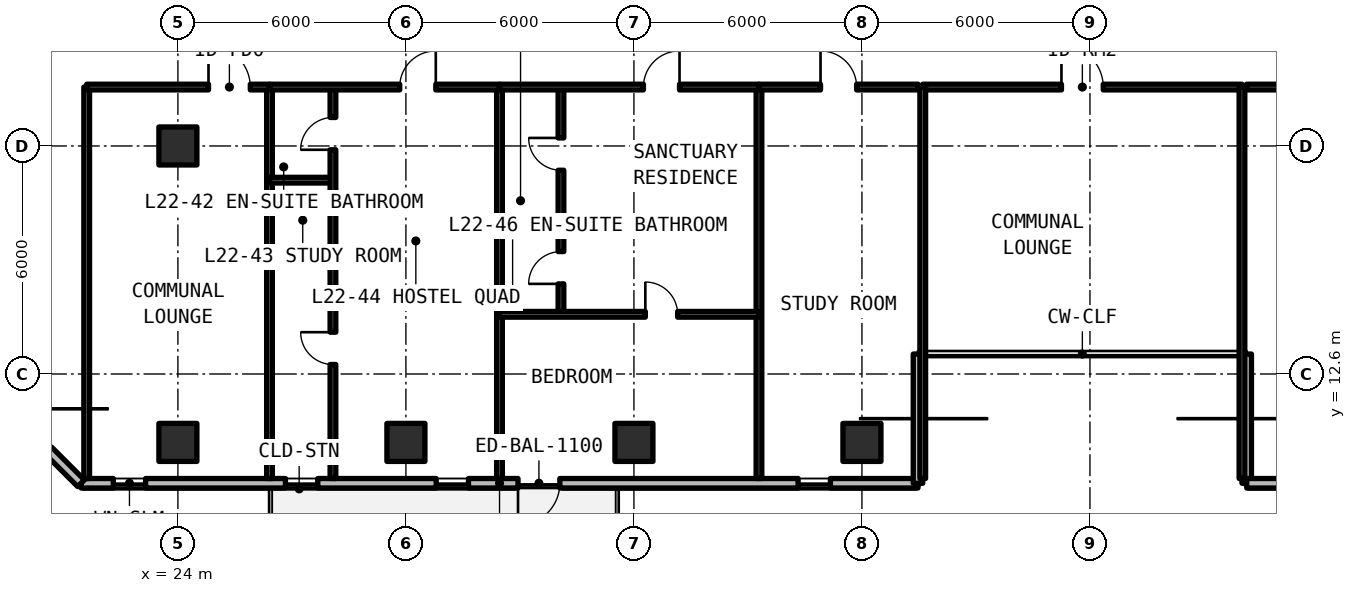
"""IFC4 building model, lengths in metres.
Left out: names, types, materials, properties, quantities, classifications, styles, units other than length and angle.
Written with IfcOpenShell. Run it as: python <this file> out.ifc"""

import sys

from ifc_helpers import new_model, si_unit, direction, frame, frame_2d, origin, origin_2d, place, context, subcontext, project, spatial, rectangle, extrude, element, fill, save


model = new_model("IFC4")
c1 = context("Model", 3, precision=1e-05, world=origin(), true_north=direction((0.0, 1.0)))
c2 = subcontext(c1, "Body", "Model", "MODEL_VIEW")
j1 = project(units=[si_unit("LENGTHUNIT", "METRE"), si_unit("PLANEANGLEUNIT", "RADIAN")], contexts=[c1])
p1 = place(None, origin())
s1 = spatial("IfcSite", under=j1, at=p1, CompositionType="ELEMENT")
p2 = place(p1, origin())
s2 = spatial("IfcBuilding", under=s1, at=p2, CompositionType="ELEMENT")
p3 = place(p2, frame((0.0, 0.0, 82.17)))
s3 = spatial("IfcBuildingStorey", under=s2, at=p3, CompositionType="ELEMENT", Elevation=82.17)
for number, where, z_axis, x_axis in (
    (1, (24.0, 18.6, 0.0), (0.0, 0.0, 1.0), (1.0, 0.0, 0.0)),
    (2, (24.0, 10.8, 0.0), (0.0, 0.0, 1.0), (1.0, 0.0, 0.0)),
    (3, (30.0, 10.8, 0.0), (0.0, 0.0, 1.0), (1.0, 0.0, 0.0)),
    (4, (36.0, 10.8, 0.0), (0.0, 0.0, 1.0), (1.0, 0.0, 0.0)),
    (5, (42.0, 10.8, 0.0), (0.0, 0.0, 1.0), (1.0, 0.0, 0.0)),
):
    element("IfcColumn", number, at=place(p3, frame(where, z_axis=z_axis, x_axis=x_axis)), inside=s3, PredefinedType="COLUMN", context=c2, shape_type="SweptSolid", body=[
        extrude(rectangle(XDim=1.0, YDim=1.0, at=origin_2d()), origin(), (0.0, 0.0, 1.0), 3.3),
    ])
p4 = place(p3, frame((21.452, 9.725, 0.0), z_axis=(0.0, 0.0, 1.0), x_axis=(1.0, 0.0, 0.0)))
e6 = element("IfcWall", 6, at=p4, inside=s3, PredefinedType="SOLIDWALL", context=c2, shape_type="SweptSolid", body=[
    extrude(rectangle(XDim=22.023, YDim=0.25, at=frame_2d((11.012, 0.0))), origin(), (0.0, 0.0, 1.0), 3.08),
])
p5 = place(p4, frame((11.498, 0.0, 0.0)))
e7 = element("IfcOpeningElement", 7, at=p5, cuts=e6, PredefinedType="OPENING", context=c2, shape_type="SweptSolid", body=[
    extrude(rectangle(XDim=1.1, YDim=2.15, at=frame_2d((0.55, 1.075))), frame((0.0, 0.135, 0.0), z_axis=(0.0, -1.0, 0.0), x_axis=(1.0, 0.0, 0.0)), (0.0, 0.0, 1.0), 0.27),
])
p6 = place(p4, frame((0.848, 0.0, 0.78)))
e8 = element("IfcOpeningElement", 8, at=p6, cuts=e6, PredefinedType="OPENING", context=c2, shape_type="SweptSolid", body=[
    extrude(rectangle(XDim=0.85, YDim=1.65, at=frame_2d((0.425, 0.825))), frame((0.0, 0.135, 0.0), z_axis=(0.0, -1.0, 0.0), x_axis=(1.0, 0.0, 0.0)), (0.0, 0.0, 1.0), 0.27),
])
p7 = place(p4, frame((5.378, 0.0, 0.78)))
e9 = element("IfcOpeningElement", 9, at=p7, cuts=e6, PredefinedType="OPENING", context=c2, shape_type="SweptSolid", body=[
    extrude(rectangle(XDim=0.85, YDim=1.65, at=frame_2d((0.425, 0.825))), frame((0.0, 0.135, 0.0), z_axis=(0.0, -1.0, 0.0), x_axis=(1.0, 0.0, 0.0)), (0.0, 0.0, 1.0), 0.27),
])
p8 = place(p4, frame((9.344, 0.0, 0.78)))
e10 = element("IfcOpeningElement", 10, at=p8, cuts=e6, PredefinedType="OPENING", context=c2, shape_type="SweptSolid", body=[
    extrude(rectangle(XDim=0.85, YDim=1.65, at=frame_2d((0.425, 0.825))), frame((0.0, 0.135, 0.0), z_axis=(0.0, -1.0, 0.0), x_axis=(1.0, 0.0, 0.0)), (0.0, 0.0, 1.0), 0.27),
])
p9 = place(p4, frame((18.868, 0.0, 0.78)))
e11 = element("IfcOpeningElement", 11, at=p9, cuts=e6, PredefinedType="OPENING", context=c2, shape_type="SweptSolid", body=[
    extrude(rectangle(XDim=0.85, YDim=1.65, at=frame_2d((0.425, 0.825))), frame((0.0, 0.135, 0.0), z_axis=(0.0, -1.0, 0.0), x_axis=(1.0, 0.0, 0.0)), (0.0, 0.0, 1.0), 0.27),
])
for number, where, z_axis, x_axis in (
    (12, (43.475, 9.725, 0.0), (0.0, 0.0, 1.0), (0.0, 1.0, 0.0)),
    (13, (52.125, 13.125, 0.0), (0.0, 0.0, 1.0), (0.0, -1.0, 0.0)),
):
    element("IfcWall", number, at=place(p3, frame(where, z_axis=z_axis, x_axis=x_axis)), inside=s3, PredefinedType="SOLIDWALL", context=c2, shape_type="SweptSolid", body=[
        extrude(rectangle(XDim=3.4, YDim=0.25, at=frame_2d((1.7, 0.0))), origin(), (0.0, 0.0, 1.0), 3.08),
    ])
p10 = place(p3, frame((52.125, 9.725, 0.0), z_axis=(0.0, 0.0, 1.0), x_axis=(1.0, 0.0, 0.0)))
e14 = element("IfcWall", 14, at=p10, inside=s3, PredefinedType="SOLIDWALL", context=c2, shape_type="SweptSolid", body=[
    extrude(rectangle(XDim=44.023, YDim=0.25, at=frame_2d((22.012, 0.0))), origin(), (0.0, 0.0, 1.0), 3.08),
])
p11 = place(p10, frame((10.875, 0.0, 0.0)))
e15 = element("IfcOpeningElement", 15, at=p11, cuts=e14, PredefinedType="OPENING", context=c2, shape_type="SweptSolid", body=[
    extrude(rectangle(XDim=1.1, YDim=2.15, at=frame_2d((0.55, 1.075))), frame((0.0, 0.135, 0.0), z_axis=(0.0, -1.0, 0.0), x_axis=(1.0, 0.0, 0.0)), (0.0, 0.0, 1.0), 0.27),
])
p12 = place(p10, frame((22.975, 0.0, 0.0)))
e16 = element("IfcOpeningElement", 16, at=p12, cuts=e14, PredefinedType="OPENING", context=c2, shape_type="SweptSolid", body=[
    extrude(rectangle(XDim=1.1, YDim=2.15, at=frame_2d((0.55, 1.075))), frame((0.0, 0.135, 0.0), z_axis=(0.0, -1.0, 0.0), x_axis=(1.0, 0.0, 0.0)), (0.0, 0.0, 1.0), 0.27),
])
p13 = place(p10, frame((35.075, 0.0, 0.0)))
e17 = element("IfcOpeningElement", 17, at=p13, cuts=e14, PredefinedType="OPENING", context=c2, shape_type="SweptSolid", body=[
    extrude(rectangle(XDim=1.1, YDim=2.15, at=frame_2d((0.55, 1.075))), frame((0.0, 0.135, 0.0), z_axis=(0.0, -1.0, 0.0), x_axis=(1.0, 0.0, 0.0)), (0.0, 0.0, 1.0), 0.27),
])
p14 = place(p10, frame((2.669, 0.0, 0.78)))
e18 = element("IfcOpeningElement", 18, at=p14, cuts=e14, PredefinedType="OPENING", context=c2, shape_type="SweptSolid", body=[
    extrude(rectangle(XDim=2.0, YDim=1.66, at=frame_2d((1.0, 0.83))), frame((0.0, 0.135, 0.0), z_axis=(0.0, -1.0, 0.0), x_axis=(1.0, 0.0, 0.0)), (0.0, 0.0, 1.0), 0.27),
])
p15 = place(p10, frame((8.314, 0.0, 0.78)))
e19 = element("IfcOpeningElement", 19, at=p15, cuts=e14, PredefinedType="OPENING", context=c2, shape_type="SweptSolid", body=[
    extrude(rectangle(XDim=0.85, YDim=1.65, at=frame_2d((0.425, 0.825))), frame((0.0, 0.135, 0.0), z_axis=(0.0, -1.0, 0.0), x_axis=(1.0, 0.0, 0.0)), (0.0, 0.0, 1.0), 0.27),
])
p16 = place(p10, frame((27.363, 0.0, 0.78)))
e20 = element("IfcOpeningElement", 20, at=p16, cuts=e14, PredefinedType="OPENING", context=c2, shape_type="SweptSolid", body=[
    extrude(rectangle(XDim=2.0, YDim=1.66, at=frame_2d((1.0, 0.83))), frame((0.0, 0.135, 0.0), z_axis=(0.0, -1.0, 0.0), x_axis=(1.0, 0.0, 0.0)), (0.0, 0.0, 1.0), 0.27),
])
p17 = place(p10, frame((40.048, 0.0, 0.78)))
e21 = element("IfcOpeningElement", 21, at=p17, cuts=e14, PredefinedType="OPENING", context=c2, shape_type="SweptSolid", body=[
    extrude(rectangle(XDim=2.0, YDim=1.66, at=frame_2d((1.0, 0.83))), frame((0.0, 0.135, 0.0), z_axis=(0.0, -1.0, 0.0), x_axis=(1.0, 0.0, 0.0)), (0.0, 0.0, 1.0), 0.27),
])
p18 = place(p3, frame((17.325, 13.852, 0.0), z_axis=(0.0, 0.0, 1.0), x_axis=(0.707127696864, -0.70708586489, 0.0)))
e22 = element("IfcWall", 22, at=p18, inside=s3, PredefinedType="SOLIDWALL", context=c2, shape_type="SweptSolid", body=[
    extrude(rectangle(XDim=5.836, YDim=0.25, at=frame_2d((2.918, 0.0))), origin(), (0.0, 0.0, 1.0), 3.08),
])
p19 = place(p18, frame((1.218, 0.0, 0.78)))
e23 = element("IfcOpeningElement", 23, at=p19, cuts=e22, PredefinedType="OPENING", context=c2, shape_type="SweptSolid", body=[
    extrude(rectangle(XDim=3.4, YDim=1.66, at=frame_2d((1.7, 0.83))), frame((0.0, 0.135, 0.0), z_axis=(0.0, -1.0, 0.0), x_axis=(1.0, 0.0, 0.0)), (0.0, 0.0, 1.0), 0.27),
])
p20 = place(p3, frame((43.6, 20.15, 0.0), z_axis=(0.0, 0.0, 1.0), x_axis=(1.0, 0.0, 0.0)))
e24 = element("IfcWall", 24, at=p20, inside=s3, PredefinedType="SOLIDWALL", context=c2, shape_type="SweptSolid", body=[
    extrude(rectangle(XDim=8.4, YDim=0.15, at=frame_2d((4.2, 0.0))), origin(), (0.0, 0.0, 1.0), 2.35),
])
p21 = place(p20, frame((3.65, 0.0, 0.0)))
e25 = element("IfcOpeningElement", 25, at=p21, cuts=e24, PredefinedType="OPENING", context=c2, shape_type="SweptSolid", body=[
    extrude(rectangle(XDim=1.1, YDim=2.15, at=frame_2d((0.55, 1.075))), frame((0.0, 0.085, 0.0), z_axis=(0.0, -1.0, 0.0), x_axis=(1.0, 0.0, 0.0)), (0.0, 0.0, 1.0), 0.17),
])
for number, where, z_axis, x_axis in (
    (26, (43.6, 9.85, 0.0), (0.0, 0.0, 1.0), (0.0, 1.0, 0.0)),
    (27, (52.0, 9.85, 0.0), (0.0, 0.0, 1.0), (0.0, 1.0, 0.0)),
    (28, (21.6, 9.85, 0.0), (0.0, 0.0, 1.0), (0.0, 1.0, 0.0)),
    (29, (26.41, 9.85, 0.0), (0.0, 0.0, 1.0), (0.0, 1.0, 0.0)),
):
    element("IfcWall", number, at=place(p3, frame(where, z_axis=z_axis, x_axis=x_axis)), inside=s3, PredefinedType="SOLIDWALL", context=c2, shape_type="SweptSolid", body=[
        extrude(rectangle(XDim=10.3, YDim=0.15, at=frame_2d((5.15, 0.0))), origin(), (0.0, 0.0, 1.0), 2.35),
    ])
p22 = place(p3, frame((21.6, 20.15, 0.0), z_axis=(0.0, 0.0, 1.0), x_axis=(1.0, 0.0, 0.0)))
e30 = element("IfcWall", 30, at=p22, inside=s3, PredefinedType="SOLIDWALL", context=c2, shape_type="SweptSolid", body=[
    extrude(rectangle(XDim=4.81, YDim=0.15, at=frame_2d((2.405, 0.0))), origin(), (0.0, 0.0, 1.0), 2.35),
])
p23 = place(p22, frame((3.205, 0.0, 0.0)))
e31 = element("IfcOpeningElement", 31, at=p23, cuts=e30, PredefinedType="OPENING", context=c2, shape_type="SweptSolid", body=[
    extrude(rectangle(XDim=1.1, YDim=2.15, at=frame_2d((0.55, 1.075))), frame((0.0, 0.085, 0.0), z_axis=(0.0, -1.0, 0.0), x_axis=(1.0, 0.0, 0.0)), (0.0, 0.0, 1.0), 0.17),
])
p24 = place(p3, frame((32.462, 9.85, 0.0), z_axis=(0.0, 0.0, 1.0), x_axis=(0.0, 1.0, 0.0)))
e32 = element("IfcWall", 32, at=p24, inside=s3, PredefinedType="SOLIDWALL", context=c2, shape_type="SweptSolid", body=[
    extrude(rectangle(XDim=10.3, YDim=0.15, at=frame_2d((5.15, 0.0))), origin(), (0.0, 0.0, 1.0), 2.35),
])
p25 = place(p3, frame((26.41, 17.7, 0.0), z_axis=(0.0, 0.0, 1.0), x_axis=(1.0, 0.0, 0.0)))
e33 = element("IfcWall", 33, at=p25, inside=s3, PredefinedType="PARTITIONING", context=c2, shape_type="SweptSolid", body=[
    extrude(rectangle(XDim=1.67, YDim=0.15, at=frame_2d((0.835, 0.0))), origin(), (0.0, 0.0, 1.0), 2.35),
])
p26 = place(p3, frame((28.08, 9.85, 0.0), z_axis=(0.0, 0.0, 1.0), x_axis=(0.0, 1.0, 0.0)))
e34 = element("IfcWall", 34, at=p26, inside=s3, PredefinedType="PARTITIONING", context=c2, shape_type="SweptSolid", body=[
    extrude(rectangle(XDim=10.3, YDim=0.15, at=frame_2d((5.15, 0.0))), origin(), (0.0, 0.0, 1.0), 2.35),
])
p27 = place(p26, frame((3.0, 0.0, 0.0)))
e35 = element("IfcOpeningElement", 35, at=p27, cuts=e34, PredefinedType="OPENING", context=c2, shape_type="SweptSolid", body=[
    extrude(rectangle(XDim=0.85, YDim=2.1, at=frame_2d((0.425, 1.05))), frame((0.0, 0.085, 0.0), z_axis=(0.0, -1.0, 0.0), x_axis=(1.0, 0.0, 0.0)), (0.0, 0.0, 1.0), 0.17),
])
p28 = place(p26, frame((8.65, 0.0, 0.0)))
e36 = element("IfcOpeningElement", 36, at=p28, cuts=e34, PredefinedType="OPENING", context=c2, shape_type="SweptSolid", body=[
    extrude(rectangle(XDim=0.85, YDim=2.1, at=frame_2d((0.425, 1.05))), frame((0.0, 0.085, 0.0), z_axis=(0.0, -1.0, 0.0), x_axis=(1.0, 0.0, 0.0)), (0.0, 0.0, 1.0), 0.17),
])
p29 = place(p3, frame((26.41, 20.15, 0.0), z_axis=(0.0, 0.0, 1.0), x_axis=(1.0, 0.0, 0.0)))
e37 = element("IfcWall", 37, at=p29, inside=s3, PredefinedType="SOLIDWALL", context=c2, shape_type="SweptSolid", body=[
    extrude(rectangle(XDim=6.052, YDim=0.15, at=frame_2d((3.026, 0.0))), origin(), (0.0, 0.0, 1.0), 2.35),
])
p30 = place(p29, frame((3.426, 0.0, 0.0)))
e38 = element("IfcOpeningElement", 38, at=p30, cuts=e37, PredefinedType="OPENING", context=c2, shape_type="SweptSolid", body=[
    extrude(rectangle(XDim=0.95, YDim=2.15, at=frame_2d((0.475, 1.075))), frame((0.0, 0.085, 0.0), z_axis=(0.0, -1.0, 0.0), x_axis=(1.0, 0.0, 0.0)), (0.0, 0.0, 1.0), 0.17),
])
p31 = place(p3, frame((39.29, 9.85, 0.0), z_axis=(0.0, 0.0, 1.0), x_axis=(0.0, 1.0, 0.0)))
e39 = element("IfcWall", 39, at=p31, inside=s3, PredefinedType="SOLIDWALL", context=c2, shape_type="SweptSolid", body=[
    extrude(rectangle(XDim=10.3, YDim=0.15, at=frame_2d((5.15, 0.0))), origin(), (0.0, 0.0, 1.0), 2.35),
])
p32 = place(p3, frame((32.462, 16.622, 0.0), z_axis=(0.0, 0.0, 1.0), x_axis=(1.0, 0.0, 0.0)))
e40 = element("IfcWall", 40, at=p32, inside=s3, PredefinedType="PARTITIONING", context=c2, shape_type="SweptSolid", body=[
    extrude(rectangle(XDim=1.618, YDim=0.15, at=frame_2d((0.809, 0.0))), origin(), (0.0, 0.0, 1.0), 2.35),
])
p33 = place(p3, frame((34.08, 14.171, 0.0), z_axis=(0.0, 0.0, 1.0), x_axis=(0.0, 1.0, 0.0)))
e41 = element("IfcWall", 41, at=p33, inside=s3, PredefinedType="PARTITIONING", context=c2, shape_type="SweptSolid", body=[
    extrude(rectangle(XDim=5.979, YDim=0.15, at=frame_2d((2.99, 0.0))), origin(), (0.0, 0.0, 1.0), 2.35),
])
p34 = place(p33, frame((0.801, 0.0, 0.0)))
e42 = element("IfcOpeningElement", 42, at=p34, cuts=e41, PredefinedType="OPENING", context=c2, shape_type="SweptSolid", body=[
    extrude(rectangle(XDim=0.85, YDim=2.1, at=frame_2d((0.425, 1.05))), frame((0.0, 0.085, 0.0), z_axis=(0.0, -1.0, 0.0), x_axis=(1.0, 0.0, 0.0)), (0.0, 0.0, 1.0), 0.17),
])
p35 = place(p33, frame((3.791, 0.0, 0.0)))
e43 = element("IfcOpeningElement", 43, at=p35, cuts=e41, PredefinedType="OPENING", context=c2, shape_type="SweptSolid", body=[
    extrude(rectangle(XDim=0.85, YDim=2.1, at=frame_2d((0.425, 1.05))), frame((0.0, 0.085, 0.0), z_axis=(0.0, -1.0, 0.0), x_axis=(1.0, 0.0, 0.0)), (0.0, 0.0, 1.0), 0.17),
])
p36 = place(p3, frame((32.462, 14.171, 0.0), z_axis=(0.0, 0.0, 1.0), x_axis=(1.0, 0.0, 0.0)))
e44 = element("IfcWall", 44, at=p36, inside=s3, PredefinedType="PARTITIONING", context=c2, shape_type="SweptSolid", body=[
    extrude(rectangle(XDim=6.828, YDim=0.15, at=frame_2d((3.414, 0.0))), origin(), (0.0, 0.0, 1.0), 2.35),
])
p37 = place(p36, frame((3.838, 0.0, 0.0)))
e45 = element("IfcOpeningElement", 45, at=p37, cuts=e44, PredefinedType="OPENING", context=c2, shape_type="SweptSolid", body=[
    extrude(rectangle(XDim=0.85, YDim=2.1, at=frame_2d((0.425, 1.05))), frame((0.0, 0.085, 0.0), z_axis=(0.0, -1.0, 0.0), x_axis=(1.0, 0.0, 0.0)), (0.0, 0.0, 1.0), 0.17),
])
p38 = place(p3, frame((32.462, 20.15, 0.0), z_axis=(0.0, 0.0, 1.0), x_axis=(1.0, 0.0, 0.0)))
e46 = element("IfcWall", 46, at=p38, inside=s3, PredefinedType="SOLIDWALL", context=c2, shape_type="SweptSolid", body=[
    extrude(rectangle(XDim=6.828, YDim=0.15, at=frame_2d((3.414, 0.0))), origin(), (0.0, 0.0, 1.0), 2.35),
])
p39 = place(p38, frame((3.788, 0.0, 0.0)))
e47 = element("IfcOpeningElement", 47, at=p39, cuts=e46, PredefinedType="OPENING", context=c2, shape_type="SweptSolid", body=[
    extrude(rectangle(XDim=0.95, YDim=2.15, at=frame_2d((0.475, 1.075))), frame((0.0, 0.085, 0.0), z_axis=(0.0, -1.0, 0.0), x_axis=(1.0, 0.0, 0.0)), (0.0, 0.0, 1.0), 0.17),
])
p40 = place(p3, frame((39.29, 20.15, 0.0), z_axis=(0.0, 0.0, 1.0), x_axis=(1.0, 0.0, 0.0)))
e48 = element("IfcWall", 48, at=p40, inside=s3, PredefinedType="SOLIDWALL", context=c2, shape_type="SweptSolid", body=[
    extrude(rectangle(XDim=4.19, YDim=0.15, at=frame_2d((2.095, 0.0))), origin(), (0.0, 0.0, 1.0), 2.35),
])
p41 = place(p40, frame((1.62, 0.0, 0.0)))
e49 = element("IfcOpeningElement", 49, at=p41, cuts=e48, PredefinedType="OPENING", context=c2, shape_type="SweptSolid", body=[
    extrude(rectangle(XDim=0.95, YDim=2.15, at=frame_2d((0.475, 1.075))), frame((0.0, 0.085, 0.0), z_axis=(0.0, -1.0, 0.0), x_axis=(1.0, 0.0, 0.0)), (0.0, 0.0, 1.0), 0.17),
])
p42 = place(p3, frame((52.12, 20.15, 0.0), z_axis=(0.0, 0.0, 1.0), x_axis=(1.0, 0.0, 0.0)))
e50 = element("IfcWall", 50, at=p42, inside=s3, PredefinedType="SOLIDWALL", context=c2, shape_type="SweptSolid", body=[
    extrude(rectangle(XDim=6.708, YDim=0.15, at=frame_2d((3.354, 0.0))), origin(), (0.0, 0.0, 1.0), 2.35),
])
p43 = place(p42, frame((2.879, 0.0, 0.0)))
e51 = element("IfcOpeningElement", 51, at=p43, cuts=e50, PredefinedType="OPENING", context=c2, shape_type="SweptSolid", body=[
    extrude(rectangle(XDim=0.95, YDim=2.15, at=frame_2d((0.475, 1.075))), frame((0.0, 0.085, 0.0), z_axis=(0.0, -1.0, 0.0), x_axis=(1.0, 0.0, 0.0)), (0.0, 0.0, 1.0), 0.17),
])
p44 = place(p5, frame((1.1, 0.0, 0.0), z_axis=(0.0, 0.0, 1.0), x_axis=(-1.0, 0.0, 0.0)))
e52 = element("IfcDoor", 52, at=p44, inside=s3, OperationType="SINGLE_SWING_RIGHT", PredefinedType="DOOR", context=c2, shape_type="SweptSolid", body=[
    extrude(rectangle(XDim=1.1, YDim=2.15, at=frame_2d((0.55, 1.075))), frame((0.0, 0.025, 0.0), z_axis=(0.0, -1.0, 0.0), x_axis=(1.0, 0.0, 0.0)), (0.0, 0.0, 1.0), 0.05),
])
fill(e7, e52)
p45 = place(p6, origin())
e53 = element("IfcWindow", 53, at=p45, inside=s3, PartitioningType="SINGLE_PANEL", PredefinedType="WINDOW", context=c2, shape_type="SweptSolid", body=[
    extrude(rectangle(XDim=0.85, YDim=1.65, at=frame_2d((0.425, 0.825))), frame((0.0, 0.03, 0.0), z_axis=(0.0, -1.0, 0.0), x_axis=(1.0, 0.0, 0.0)), (0.0, 0.0, 1.0), 0.06),
])
fill(e8, e53)
p46 = place(p7, origin())
e54 = element("IfcWindow", 54, at=p46, inside=s3, PartitioningType="SINGLE_PANEL", PredefinedType="WINDOW", context=c2, shape_type="SweptSolid", body=[
    extrude(rectangle(XDim=0.85, YDim=1.65, at=frame_2d((0.425, 0.825))), frame((0.0, 0.03, 0.0), z_axis=(0.0, -1.0, 0.0), x_axis=(1.0, 0.0, 0.0)), (0.0, 0.0, 1.0), 0.06),
])
fill(e9, e54)
p47 = place(p8, origin())
e55 = element("IfcWindow", 55, at=p47, inside=s3, PartitioningType="SINGLE_PANEL", PredefinedType="WINDOW", context=c2, shape_type="SweptSolid", body=[
    extrude(rectangle(XDim=0.85, YDim=1.65, at=frame_2d((0.425, 0.825))), frame((0.0, 0.03, 0.0), z_axis=(0.0, -1.0, 0.0), x_axis=(1.0, 0.0, 0.0)), (0.0, 0.0, 1.0), 0.06),
])
fill(e10, e55)
p48 = place(p9, origin())
e56 = element("IfcWindow", 56, at=p48, inside=s3, PartitioningType="SINGLE_PANEL", PredefinedType="WINDOW", context=c2, shape_type="SweptSolid", body=[
    extrude(rectangle(XDim=0.85, YDim=1.65, at=frame_2d((0.425, 0.825))), frame((0.0, 0.03, 0.0), z_axis=(0.0, -1.0, 0.0), x_axis=(1.0, 0.0, 0.0)), (0.0, 0.0, 1.0), 0.06),
])
fill(e11, e56)
p49 = place(p21, origin())
e57 = element("IfcDoor", 57, at=p49, inside=s3, OperationType="SINGLE_SWING_LEFT", PredefinedType="DOOR", context=c2, shape_type="SweptSolid", body=[
    extrude(rectangle(XDim=1.1, YDim=2.15, at=frame_2d((0.55, 1.075))), frame((0.0, 0.025, 0.0), z_axis=(0.0, -1.0, 0.0), x_axis=(1.0, 0.0, 0.0)), (0.0, 0.0, 1.0), 0.05),
])
fill(e25, e57)
p50 = place(p23, origin())
e58 = element("IfcDoor", 58, at=p50, inside=s3, OperationType="SINGLE_SWING_LEFT", PredefinedType="DOOR", context=c2, shape_type="SweptSolid", body=[
    extrude(rectangle(XDim=1.1, YDim=2.15, at=frame_2d((0.55, 1.075))), frame((0.0, 0.025, 0.0), z_axis=(0.0, -1.0, 0.0), x_axis=(1.0, 0.0, 0.0)), (0.0, 0.0, 1.0), 0.05),
])
fill(e31, e58)
p51 = place(p27, origin())
e59 = element("IfcDoor", 59, at=p51, inside=s3, OperationType="SINGLE_SWING_RIGHT", PredefinedType="DOOR", context=c2, shape_type="SweptSolid", body=[
    extrude(rectangle(XDim=0.85, YDim=2.1, at=frame_2d((0.425, 1.05))), frame((0.0, 0.025, 0.0), z_axis=(0.0, -1.0, 0.0), x_axis=(1.0, 0.0, 0.0)), (0.0, 0.0, 1.0), 0.05),
])
fill(e35, e59)
p52 = place(p28, origin())
e60 = element("IfcDoor", 60, at=p52, inside=s3, OperationType="SINGLE_SWING_LEFT", PredefinedType="DOOR", context=c2, shape_type="SweptSolid", body=[
    extrude(rectangle(XDim=0.85, YDim=2.1, at=frame_2d((0.425, 1.05))), frame((0.0, 0.025, 0.0), z_axis=(0.0, -1.0, 0.0), x_axis=(1.0, 0.0, 0.0)), (0.0, 0.0, 1.0), 0.05),
])
fill(e36, e60)
p53 = place(p30, origin())
e61 = element("IfcDoor", 61, at=p53, inside=s3, OperationType="SINGLE_SWING_RIGHT", PredefinedType="DOOR", context=c2, shape_type="SweptSolid", body=[
    extrude(rectangle(XDim=0.95, YDim=2.15, at=frame_2d((0.475, 1.075))), frame((0.0, 0.025, 0.0), z_axis=(0.0, -1.0, 0.0), x_axis=(1.0, 0.0, 0.0)), (0.0, 0.0, 1.0), 0.05),
])
fill(e38, e61)
p54 = place(p34, origin())
e62 = element("IfcDoor", 62, at=p54, inside=s3, OperationType="SINGLE_SWING_LEFT", PredefinedType="DOOR", context=c2, shape_type="SweptSolid", body=[
    extrude(rectangle(XDim=0.85, YDim=2.1, at=frame_2d((0.425, 1.05))), frame((0.0, 0.025, 0.0), z_axis=(0.0, -1.0, 0.0), x_axis=(1.0, 0.0, 0.0)), (0.0, 0.0, 1.0), 0.05),
])
fill(e42, e62)
p55 = place(p35, origin())
e63 = element("IfcDoor", 63, at=p55, inside=s3, OperationType="SINGLE_SWING_RIGHT", PredefinedType="DOOR", context=c2, shape_type="SweptSolid", body=[
    extrude(rectangle(XDim=0.85, YDim=2.1, at=frame_2d((0.425, 1.05))), frame((0.0, 0.025, 0.0), z_axis=(0.0, -1.0, 0.0), x_axis=(1.0, 0.0, 0.0)), (0.0, 0.0, 1.0), 0.05),
])
fill(e43, e63)
p56 = place(p37, origin())
e64 = element("IfcDoor", 64, at=p56, inside=s3, OperationType="SINGLE_SWING_LEFT", PredefinedType="DOOR", context=c2, shape_type="SweptSolid", body=[
    extrude(rectangle(XDim=0.85, YDim=2.1, at=frame_2d((0.425, 1.05))), frame((0.0, 0.025, 0.0), z_axis=(0.0, -1.0, 0.0), x_axis=(1.0, 0.0, 0.0)), (0.0, 0.0, 1.0), 0.05),
])
fill(e45, e64)
p57 = place(p39, origin())
e65 = element("IfcDoor", 65, at=p57, inside=s3, OperationType="SINGLE_SWING_RIGHT", PredefinedType="DOOR", context=c2, shape_type="SweptSolid", body=[
    extrude(rectangle(XDim=0.95, YDim=2.15, at=frame_2d((0.475, 1.075))), frame((0.0, 0.025, 0.0), z_axis=(0.0, -1.0, 0.0), x_axis=(1.0, 0.0, 0.0)), (0.0, 0.0, 1.0), 0.05),
])
fill(e47, e65)
p58 = place(p41, origin())
e66 = element("IfcDoor", 66, at=p58, inside=s3, OperationType="SINGLE_SWING_LEFT", PredefinedType="DOOR", context=c2, shape_type="SweptSolid", body=[
    extrude(rectangle(XDim=0.95, YDim=2.15, at=frame_2d((0.475, 1.075))), frame((0.0, 0.025, 0.0), z_axis=(0.0, -1.0, 0.0), x_axis=(1.0, 0.0, 0.0)), (0.0, 0.0, 1.0), 0.05),
])
fill(e49, e66)
save(model, sys.argv[1])
